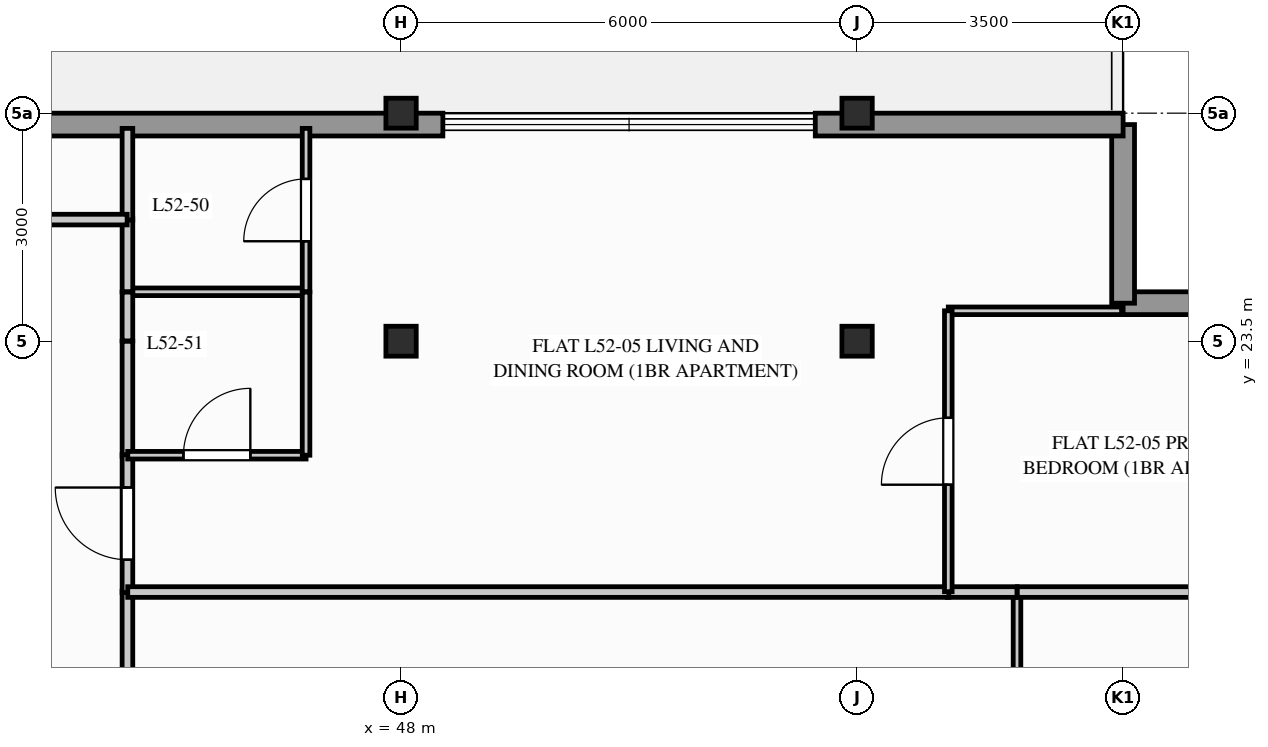
"""IFC4 building model, lengths in metres.
Left out: names, types, materials, properties, quantities, classifications, styles, units other than length and angle.
Written with IfcOpenShell. Run it as: python <this file> out.ifc"""

import sys

from ifc_helpers import new_model, si_unit, direction, frame, frame_2d, origin, origin_2d, place, context, subcontext, project, spatial, rectangle, i_section, extrude, element, fill, save


model = new_model("IFC4")
c1 = context("Model", 3, precision=1e-05, world=origin(), true_north=direction((0.0, 1.0)))
c2 = subcontext(c1, "Body", "Model", "MODEL_VIEW")
j1 = project(units=[si_unit("LENGTHUNIT", "METRE"), si_unit("PLANEANGLEUNIT", "RADIAN")], contexts=[c1])
p1 = place(None, origin())
s1 = spatial("IfcSite", under=j1, at=p1, CompositionType="ELEMENT")
p2 = place(p1, origin())
s2 = spatial("IfcBuilding", under=s1, at=p2, CompositionType="ELEMENT")
p3 = place(p2, frame((0.0, 0.0, 172.8)))
s3 = spatial("IfcBuildingStorey", under=s2, at=p3, CompositionType="ELEMENT", Elevation=172.8)
for number, where, z_axis, x_axis in (
    (1, (48.0, 23.5, 0.0), (0.0, 0.0, 1.0), (1.0, 0.0, 0.0)),
    (2, (48.0, 26.5, 0.0), (0.0, 0.0, 1.0), (1.0, 0.0, 0.0)),
    (3, (54.0, 23.5, 0.0), (0.0, 0.0, 1.0), (1.0, 0.0, 0.0)),
    (4, (54.0, 26.5, 0.0), (0.0, 0.0, 1.0), (1.0, 0.0, 0.0)),
):
    element("IfcColumn", number, at=place(p3, frame(where, z_axis=z_axis, x_axis=x_axis)), inside=s3, PredefinedType="COLUMN", context=c2, shape_type="SweptSolid", body=[
        extrude(i_section(OverallWidth=0.399, OverallDepth=0.394, WebThickness=0.023, FlangeThickness=0.037, FilletRadius=0.015, at=origin_2d()), origin(), (0.0, 0.0, 1.0), 3.1),
    ])
for number, where, z_axis, x_axis in (
    (5, (59.85, 24.0, 0.0), (0.0, 0.0, 1.0), (-1.0, 0.0, 0.0)),
    (6, (57.5, 24.0, 0.0), (0.0, 0.0, 1.0), (0.0, 1.0, 0.0)),
):
    element("IfcWall", number, at=place(p3, frame(where, z_axis=z_axis, x_axis=x_axis)), inside=s3, PredefinedType="STANDARD", context=c2, shape_type="SweptSolid", body=[
        extrude(rectangle(XDim=2.35, YDim=0.3, at=frame_2d((1.175, 0.0))), origin(), (0.0, 0.0, 1.0), 2.89),
    ])
p4 = place(p3, frame((53.45, 26.35, 0.0), z_axis=(0.0, 0.0, 1.0), x_axis=(1.0, 0.0, 0.0)))
e7 = element("IfcWall", 7, at=p4, inside=s3, PredefinedType="STANDARD", context=c2, shape_type="SweptSolid", body=[
    extrude(rectangle(XDim=4.05, YDim=0.3, at=frame_2d((2.025, 0.0))), origin(), (0.0, 0.0, 1.0), 2.89),
])
p5 = place(p3, frame((42.5, 26.35, 0.0), z_axis=(0.0, 0.0, 1.0), x_axis=(1.0, 0.0, 0.0)))
e8 = element("IfcWall", 8, at=p5, inside=s3, PredefinedType="STANDARD", context=c2, shape_type="SweptSolid", body=[
    extrude(rectangle(XDim=6.05, YDim=0.3, at=frame_2d((3.025, 0.0))), origin(), (0.0, 0.0, 1.0), 2.332),
])
p6 = place(p3, frame((44.4, 17.489, 0.0), z_axis=(0.0, 0.0, 1.0), x_axis=(0.0, 1.0, 0.0)))
e9 = element("IfcWall", 9, at=p6, inside=s3, PredefinedType="PARTITIONING", context=c2, shape_type="SweptSolid", body=[
    extrude(rectangle(XDim=2.722, YDim=0.14, at=frame_2d((1.361, 0.0))), origin(), (0.0, 0.0, 1.0), 2.562),
])
p7 = place(p3, frame((44.4, 21.989, 0.0), z_axis=(0.0, 0.0, 1.0), x_axis=(0.0, 1.0, 0.0)))
e10 = element("IfcWall", 10, at=p7, inside=s3, PredefinedType="PARTITIONING", context=c2, shape_type="SweptSolid", body=[
    extrude(rectangle(XDim=1.511, YDim=0.14, at=frame_2d((0.756, 0.0))), origin(), (0.0, 0.0, 1.0), 2.253),
])
p8 = place(p3, frame((44.4, 20.193, 0.0), z_axis=(0.0, 0.0, 1.0), x_axis=(0.0, 1.0, 0.0)))
e11 = element("IfcWall", 11, at=p8, inside=s3, PredefinedType="PARTITIONING", context=c2, shape_type="SweptSolid", body=[
    extrude(rectangle(XDim=1.815, YDim=0.14, at=frame_2d((0.907, 0.0))), origin(), (0.0, 0.0, 1.0), 2.89),
])
p9 = place(p8, frame((0.432, 0.0, 0.0)))
e12 = element("IfcOpeningElement", 12, at=p9, cuts=e11, PredefinedType="OPENING", context=c2, shape_type="SweptSolid", body=[
    extrude(rectangle(XDim=0.95, YDim=2.05, at=frame_2d((0.475, 1.025))), frame((0.0, 0.08, 0.0), z_axis=(0.0, -1.0, 0.0), x_axis=(1.0, 0.0, 0.0)), (0.0, 0.0, 1.0), 0.16),
])
p10 = place(p3, frame((56.104, 17.5, 0.0), z_axis=(0.0, 0.0, 1.0), x_axis=(0.0, 1.0, 0.0)))
e13 = element("IfcWall", 13, at=p10, inside=s3, PredefinedType="PARTITIONING", context=c2, shape_type="SweptSolid", body=[
    extrude(rectangle(XDim=2.7, YDim=0.1, at=frame_2d((1.35, 0.0))), origin(), (0.0, 0.0, 1.0), 2.562),
])
p11 = place(p3, frame((55.189, 20.2, 0.0), z_axis=(0.0, 0.0, 1.0), x_axis=(1.0, 0.0, 0.0)))
e14 = element("IfcWall", 14, at=p11, inside=s3, PredefinedType="PARTITIONING", context=c2, shape_type="SweptSolid", body=[
    extrude(rectangle(XDim=0.915, YDim=0.14, at=frame_2d((0.458, 0.0))), origin(), (0.0, 0.0, 1.0), 2.89),
])
p12 = place(p3, frame((44.404, 20.2, 0.0), z_axis=(0.0, 0.0, 1.0), x_axis=(1.0, 0.0, 0.0)))
e15 = element("IfcWall", 15, at=p12, inside=s3, PredefinedType="PARTITIONING", context=c2, shape_type="SweptSolid", body=[
    extrude(rectangle(XDim=10.803, YDim=0.14, at=frame_2d((5.402, 0.0))), origin(), (0.0, 0.0, 1.0), 2.253),
])
p13 = place(p3, frame((56.108, 20.2, 0.0), z_axis=(0.0, 0.0, 1.0), x_axis=(1.0, 0.0, 0.0)))
e16 = element("IfcWall", 16, at=p13, inside=s3, PredefinedType="PARTITIONING", context=c2, shape_type="SweptSolid", body=[
    extrude(rectangle(XDim=3.692, YDim=0.14, at=frame_2d((1.846, 0.0))), origin(), (0.0, 0.0, 1.0), 2.89),
])
p14 = place(p3, frame((44.4, 24.15, 0.0), z_axis=(0.0, 0.0, 1.0), x_axis=(1.0, 0.0, 0.0)))
e17 = element("IfcWall", 17, at=p14, inside=s3, PredefinedType="PARTITIONING", context=c2, shape_type="SweptSolid", body=[
    extrude(rectangle(XDim=2.35, YDim=0.1, at=frame_2d((1.175, 0.0))), origin(), (0.0, 0.0, 1.0), 2.89),
])
p15 = place(p3, frame((46.75, 24.15, 0.0), z_axis=(0.0, 0.0, 1.0), x_axis=(0.0, 1.0, 0.0)))
e18 = element("IfcWall", 18, at=p15, inside=s3, PredefinedType="PARTITIONING", context=c2, shape_type="SweptSolid", body=[
    extrude(rectangle(XDim=2.15, YDim=0.1, at=frame_2d((1.075, 0.0))), origin(), (0.0, 0.0, 1.0), 2.89),
])
p16 = place(p15, frame((0.665, 0.0, 0.0)))
e19 = element("IfcOpeningElement", 19, at=p16, cuts=e18, PredefinedType="OPENING", context=c2, shape_type="SweptSolid", body=[
    extrude(rectangle(XDim=0.82, YDim=2.02, at=frame_2d((0.41, 1.01))), frame((0.0, 0.06, 0.0), z_axis=(0.0, -1.0, 0.0), x_axis=(1.0, 0.0, 0.0)), (0.0, 0.0, 1.0), 0.12),
])
p17 = place(p3, frame((44.4, 24.15, 0.0), z_axis=(0.0, 0.0, 1.0), x_axis=(0.0, 1.0, 0.0)))
e20 = element("IfcWall", 20, at=p17, inside=s3, PredefinedType="PARTITIONING", context=c2, shape_type="SweptSolid", body=[
    extrude(rectangle(XDim=0.961, YDim=0.14, at=frame_2d((0.481, 0.0))), origin(), (0.0, 0.0, 1.0), 2.89),
])
p18 = place(p3, frame((44.4, 25.093, 0.0), z_axis=(0.0, 0.0, 1.0), x_axis=(0.0, 1.0, 0.0)))
e21 = element("IfcWall", 21, at=p18, inside=s3, PredefinedType="PARTITIONING", context=c2, shape_type="SweptSolid", body=[
    extrude(rectangle(XDim=1.207, YDim=0.14, at=frame_2d((0.604, 0.0))), origin(), (0.0, 0.0, 1.0), 2.89),
])
p19 = place(p3, frame((44.404, 22.0, 0.0), z_axis=(0.0, 0.0, 1.0), x_axis=(1.0, 0.0, 0.0)))
e22 = element("IfcWall", 22, at=p19, inside=s3, PredefinedType="PARTITIONING", context=c2, shape_type="SweptSolid", body=[
    extrude(rectangle(XDim=2.346, YDim=0.1, at=frame_2d((1.173, 0.0))), origin(), (0.0, 0.0, 1.0), 2.89),
])
p20 = place(p19, frame((0.733, 0.0, 0.0)))
e23 = element("IfcOpeningElement", 23, at=p20, cuts=e22, PredefinedType="OPENING", context=c2, shape_type="SweptSolid", body=[
    extrude(rectangle(XDim=0.88, YDim=2.04, at=frame_2d((0.44, 1.02))), frame((0.0, 0.06, 0.0), z_axis=(0.0, -1.0, 0.0), x_axis=(1.0, 0.0, 0.0)), (0.0, 0.0, 1.0), 0.12),
])
p21 = place(p3, frame((46.75, 22.0, 0.0), z_axis=(0.0, 0.0, 1.0), x_axis=(0.0, 1.0, 0.0)))
e24 = element("IfcWall", 24, at=p21, inside=s3, PredefinedType="PARTITIONING", context=c2, shape_type="SweptSolid", body=[
    extrude(rectangle(XDim=2.146, YDim=0.1, at=frame_2d((1.073, 0.0))), origin(), (0.0, 0.0, 1.0), 2.253),
])
p22 = place(p3, frame((44.4, 23.504, 0.0), z_axis=(0.0, 0.0, 1.0), x_axis=(0.0, 1.0, 0.0)))
e25 = element("IfcWall", 25, at=p22, inside=s3, PredefinedType="PARTITIONING", context=c2, shape_type="SweptSolid", body=[
    extrude(rectangle(XDim=0.642, YDim=0.14, at=frame_2d((0.321, 0.0))), origin(), (0.0, 0.0, 1.0), 2.253),
])
p23 = place(p3, frame((55.2, 23.9, 0.0), z_axis=(0.0, 0.0, 1.0), x_axis=(1.0, 0.0, 0.0)))
e26 = element("IfcWall", 26, at=p23, inside=s3, PredefinedType="PARTITIONING", context=c2, shape_type="SweptSolid", body=[
    extrude(rectangle(XDim=2.28, YDim=0.1, at=frame_2d((1.14, 0.0))), origin(), (0.0, 0.0, 1.0), 2.89),
])
p24 = place(p3, frame((55.2, 20.204, 0.0), z_axis=(0.0, 0.0, 1.0), x_axis=(0.0, 1.0, 0.0)))
e27 = element("IfcWall", 27, at=p24, inside=s3, PredefinedType="PARTITIONING", context=c2, shape_type="SweptSolid", body=[
    extrude(rectangle(XDim=3.696, YDim=0.1, at=frame_2d((1.848, 0.0))), origin(), (0.0, 0.0, 1.0), 2.253),
])
p25 = place(p24, frame((1.408, 0.0, 0.0)))
e28 = element("IfcOpeningElement", 28, at=p25, cuts=e27, PredefinedType="OPENING", context=c2, shape_type="SweptSolid", body=[
    extrude(rectangle(XDim=0.88, YDim=2.04, at=frame_2d((0.44, 1.02))), frame((0.0, 0.06, 0.0), z_axis=(0.0, -1.0, 0.0), x_axis=(1.0, 0.0, 0.0)), (0.0, 0.0, 1.0), 0.12),
])
p26 = place(p3, frame((32.993, 25.1, 0.0), z_axis=(0.0, 0.0, 1.0), x_axis=(1.0, 0.0, 0.0)))
e29 = element("IfcWall", 29, at=p26, inside=s3, PredefinedType="PARTITIONING", context=c2, shape_type="SweptSolid", body=[
    extrude(rectangle(XDim=11.403, YDim=0.14, at=frame_2d((5.702, 0.0))), origin(), (0.0, 0.0, 1.0), 2.253),
])
p27 = place(p26, frame((5.667, 0.0, 0.0)))
e30 = element("IfcOpeningElement", 30, at=p27, cuts=e29, PredefinedType="OPENING", context=c2, shape_type="SweptSolid", body=[
    extrude(rectangle(XDim=0.95, YDim=2.05, at=frame_2d((0.475, 1.025))), frame((0.0, 0.08, 0.0), z_axis=(0.0, -1.0, 0.0), x_axis=(1.0, 0.0, 0.0)), (0.0, 0.0, 1.0), 0.16),
])
p28 = place(p9, origin())
e31 = element("IfcDoor", 31, at=p28, inside=s3, OperationType="SINGLE_SWING_RIGHT", PredefinedType="DOOR", context=c2, shape_type="SweptSolid", body=[
    extrude(rectangle(XDim=0.95, YDim=2.05, at=frame_2d((0.475, 1.025))), frame((0.0, 0.025, 0.0), z_axis=(0.0, -1.0, 0.0), x_axis=(1.0, 0.0, 0.0)), (0.0, 0.0, 1.0), 0.05),
])
fill(e12, e31)
p29 = place(p16, origin())
e32 = element("IfcDoor", 32, at=p29, inside=s3, OperationType="SINGLE_SWING_LEFT", PredefinedType="DOOR", context=c2, shape_type="SweptSolid", body=[
    extrude(rectangle(XDim=0.82, YDim=2.02, at=frame_2d((0.41, 1.01))), frame((0.0, 0.025, 0.0), z_axis=(0.0, -1.0, 0.0), x_axis=(1.0, 0.0, 0.0)), (0.0, 0.0, 1.0), 0.05),
])
fill(e19, e32)
p30 = place(p20, origin())
e33 = element("IfcDoor", 33, at=p30, inside=s3, OperationType="SINGLE_SWING_RIGHT", PredefinedType="DOOR", context=c2, shape_type="SweptSolid", body=[
    extrude(rectangle(XDim=0.88, YDim=2.04, at=frame_2d((0.44, 1.02))), frame((0.0, 0.025, 0.0), z_axis=(0.0, -1.0, 0.0), x_axis=(1.0, 0.0, 0.0)), (0.0, 0.0, 1.0), 0.05),
])
fill(e23, e33)
p31 = place(p25, origin())
e34 = element("IfcDoor", 34, at=p31, inside=s3, OperationType="SINGLE_SWING_LEFT", PredefinedType="DOOR", context=c2, shape_type="SweptSolid", body=[
    extrude(rectangle(XDim=0.88, YDim=2.04, at=frame_2d((0.44, 1.02))), frame((0.0, 0.025, 0.0), z_axis=(0.0, -1.0, 0.0), x_axis=(1.0, 0.0, 0.0)), (0.0, 0.0, 1.0), 0.05),
])
fill(e28, e34)
save(model, sys.argv[1])
